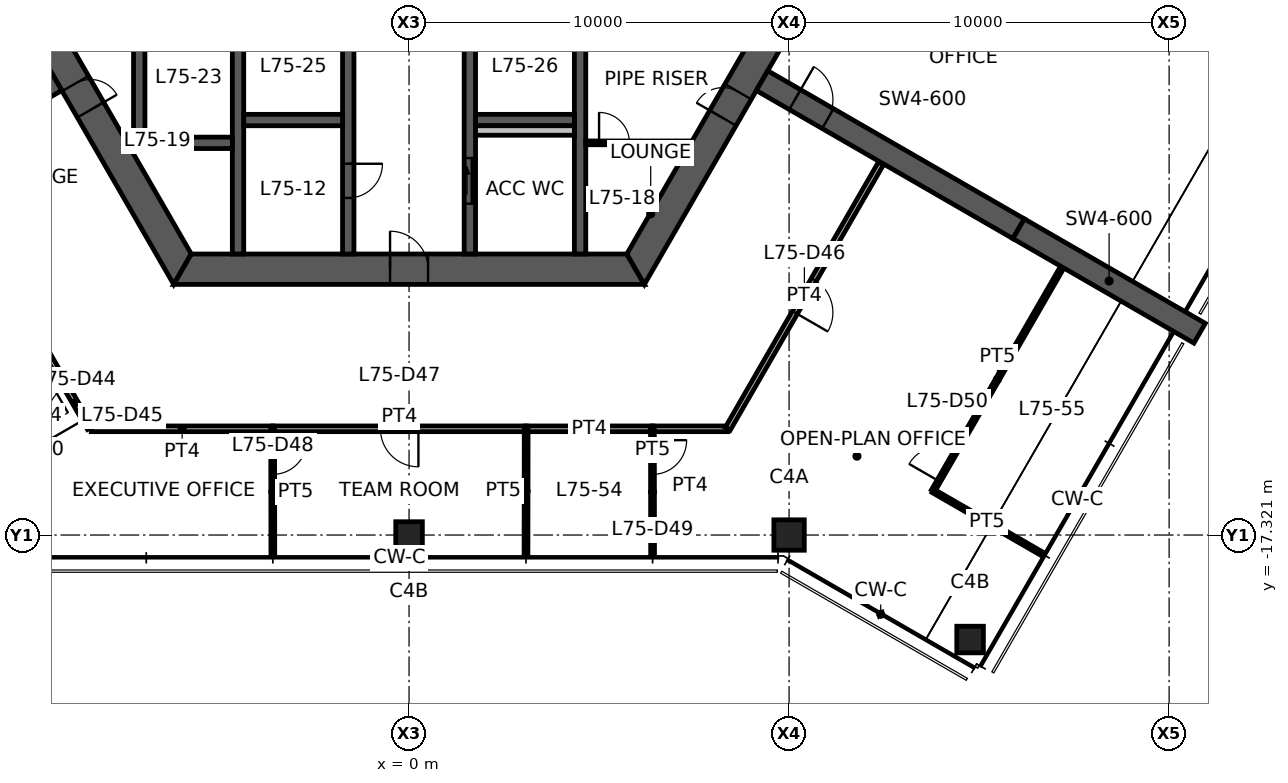
"""IFC4 building model, lengths in metres.
Left out: names, types, materials, properties, quantities, classifications, styles, units other than length and angle.
Written with IfcOpenShell. Run it as: python <this file> out.ifc"""

import sys

from ifc_helpers import new_model, si_unit, direction, frame, frame_2d, origin, origin_2d, place, context, subcontext, project, spatial, polyline, rectangle, hollow_rectangle, outline, extrude, element, fill, save


model = new_model("IFC4")
c1 = context("Model", 3, precision=1e-05, world=origin(), true_north=direction((0.0, 1.0)))
c2 = subcontext(c1, "Body", "Model", "MODEL_VIEW")
j1 = project(units=[si_unit("LENGTHUNIT", "METRE"), si_unit("PLANEANGLEUNIT", "RADIAN")], contexts=[c1])
p1 = place(None, origin())
s1 = spatial("IfcSite", under=j1, at=p1, CompositionType="ELEMENT")
p2 = place(p1, origin())
s2 = spatial("IfcBuilding", under=s1, at=p2, CompositionType="ELEMENT")
p3 = place(p2, frame((0.0, 0.0, 298.6)))
s3 = spatial("IfcBuildingStorey", under=s2, at=p3, CompositionType="ELEMENT", Elevation=298.6)
p4 = place(p3, frame((10.0, -17.321, 0.0), z_axis=(0.0, 0.0, 1.0), x_axis=(1.0, 0.0, 0.0)))
e1 = element("IfcColumn", 1, at=p4, inside=s3, PredefinedType="COLUMN", context=c2, shape_type="SweptSolid", body=[
    extrude(hollow_rectangle(XDim=0.8, YDim=0.8, WallThickness=0.04, at=origin_2d()), origin(), (0.0, 0.0, 1.0), 3.9),
])
for number, where, z_axis, x_axis in (
    (2, (0.0, -17.321, 0.0), (0.0, 0.0, 1.0), (1.0, 0.0, 0.0)),
    (3, (14.763, -20.071, 0.0), (0.0, 0.0, 1.0), (1.0, 0.0, 0.0)),
):
    element("IfcColumn", number, at=place(p3, frame(where, z_axis=z_axis, x_axis=x_axis)), inside=s3, PredefinedType="COLUMN", context=c2, shape_type="SweptSolid", body=[
        extrude(hollow_rectangle(XDim=0.7, YDim=0.7, WallThickness=0.032, at=origin_2d()), origin(), (0.0, 0.0, 1.0), 3.9),
    ])
p5 = place(p3, frame((-11.922, 0.0, 0.0), z_axis=(0.0, 0.0, 1.0), x_axis=(0.500004296715, -0.866022923061, 0.0)))
e4 = element("IfcWall", 4, at=p5, inside=s3, PredefinedType="SHEAR", context=c2, shape_type="SweptSolid", body=[
    extrude(outline(polyline([(-0.231, -0.4), (6.281, -0.4), (7.081, -0.4), (12.153, -0.4), (11.691, 0.4), (7.081, 0.4), (6.281, 0.4), (0.231, 0.4), (-0.231, -0.4)])), origin(), (0.0, 0.0, 1.0), 3.9),
])
p6 = place(p5, frame((6.281, 0.0, 0.0)))
e5 = element("IfcOpeningElement", 5, at=p6, cuts=e4, PredefinedType="OPENING", context=c2, shape_type="SweptSolid", body=[
    extrude(rectangle(XDim=0.8, YDim=2.1, at=frame_2d((0.4, 1.05))), frame((0.0, 0.41, 0.0), z_axis=(0.0, -1.0, 0.0), x_axis=(1.0, 0.0, 0.0)), (0.0, 0.0, 1.0), 0.82),
])
p7 = place(p3, frame((-5.961, -10.325, 0.0), z_axis=(0.0, 0.0, 1.0), x_axis=(1.0, 0.0, 0.0)))
e6 = element("IfcWall", 6, at=p7, inside=s3, PredefinedType="SHEAR", context=c2, shape_type="SweptSolid", body=[
    extrude(outline(polyline([(-0.231, -0.4), (5.461, -0.4), (6.461, -0.4), (12.153, -0.4), (11.691, 0.4), (6.461, 0.4), (5.461, 0.4), (0.231, 0.4), (-0.231, -0.4)])), origin(), (0.0, 0.0, 1.0), 3.9),
])
p8 = place(p7, frame((5.461, 0.0, 0.0)))
e7 = element("IfcOpeningElement", 7, at=p8, cuts=e6, PredefinedType="OPENING", context=c2, shape_type="SweptSolid", body=[
    extrude(rectangle(XDim=1.0, YDim=2.1, at=frame_2d((0.5, 1.05))), frame((0.0, 0.41, 0.0), z_axis=(0.0, -1.0, 0.0), x_axis=(1.0, 0.0, 0.0)), (0.0, 0.0, 1.0), 0.82),
])
p9 = place(p3, frame((5.961, -10.325, 0.0), z_axis=(0.0, 0.0, 1.0), x_axis=(0.500004296715, 0.866022923061, 0.0)))
e8 = element("IfcWall", 8, at=p9, inside=s3, PredefinedType="SHEAR", context=c2, shape_type="SweptSolid", body=[
    extrude(outline(polyline([(-0.231, -0.4), (4.594, -0.4), (5.394, -0.4), (12.153, -0.4), (11.691, 0.4), (5.394, 0.4), (4.594, 0.4), (0.231, 0.4), (-0.231, -0.4)])), origin(), (0.0, 0.0, 1.0), 3.9),
])
p10 = place(p9, frame((4.594, 0.0, 0.0)))
e9 = element("IfcOpeningElement", 9, at=p10, cuts=e8, PredefinedType="OPENING", context=c2, shape_type="SweptSolid", body=[
    extrude(rectangle(XDim=0.8, YDim=2.1, at=frame_2d((0.4, 1.05))), frame((0.0, 0.41, 0.0), z_axis=(0.0, -1.0, 0.0), x_axis=(1.0, 0.0, 0.0)), (0.0, 0.0, 1.0), 0.82),
])
p11 = place(p3, frame((-9.288, -5.363, 0.0), z_axis=(0.0, 0.0, 1.0), x_axis=(-0.866027473358, -0.499996415376, 0.0)))
e10 = element("IfcWall", 10, at=p11, inside=s3, PredefinedType="SHEAR", context=c2, shape_type="SweptSolid", body=[
    extrude(rectangle(XDim=7.045, YDim=0.6, at=frame_2d((3.523, 0.0))), origin(), (0.0, 0.0, 1.0), 3.9),
])
p12 = place(p11, frame((1.0, 0.0, 0.0)))
e11 = element("IfcOpeningElement", 11, at=p12, cuts=e10, PredefinedType="OPENING", context=c2, shape_type="SweptSolid", body=[
    extrude(rectangle(XDim=1.0, YDim=2.1, at=frame_2d((0.5, 1.05))), frame((0.0, 0.31, 0.0), z_axis=(0.0, -1.0, 0.0), x_axis=(1.0, 0.0, 0.0)), (0.0, 0.0, 1.0), 0.62),
])
p13 = place(p3, frame((9.288, -5.363, 0.0), z_axis=(0.0, 0.0, 1.0), x_axis=(0.866031736626, -0.499989031036, 0.0)))
e12 = element("IfcWall", 12, at=p13, inside=s3, PredefinedType="SHEAR", context=c2, shape_type="SweptSolid", body=[
    extrude(rectangle(XDim=7.796, YDim=0.6, at=frame_2d((3.898, 0.0))), origin(), (0.0, 0.0, 1.0), 3.9),
])
p14 = place(p13, frame((1.0, 0.0, 0.0)))
e13 = element("IfcOpeningElement", 13, at=p14, cuts=e12, PredefinedType="OPENING", context=c2, shape_type="SweptSolid", body=[
    extrude(rectangle(XDim=1.0, YDim=2.1, at=frame_2d((0.5, 1.05))), frame((0.0, 0.31, 0.0), z_axis=(0.0, -1.0, 0.0), x_axis=(1.0, 0.0, 0.0)), (0.0, 0.0, 1.0), 0.62),
])
p15 = place(p3, frame((16.039, -9.26, 0.0), z_axis=(0.0, 0.0, 1.0), x_axis=(0.866027397988, -0.499996545922, 0.0)))
e14 = element("IfcWall", 14, at=p15, inside=s3, PredefinedType="SHEAR", context=c2, shape_type="SweptSolid", body=[
    extrude(rectangle(XDim=5.5, YDim=0.6, at=frame_2d((2.75, 0.0))), origin(), (0.0, 0.0, 1.0), 3.9),
])
p16 = place(p3, frame((-1.6, -3.75, 0.0), z_axis=(0.0, 0.0, 1.0), x_axis=(0.0, -1.0, 0.0)))
e15 = element("IfcWall", 15, at=p16, inside=s3, PredefinedType="SHEAR", context=c2, shape_type="SweptSolid", body=[
    extrude(rectangle(XDim=6.175, YDim=0.3, at=frame_2d((3.087, 0.0))), origin(), (0.0, 0.0, 1.0), 3.9),
])
p17 = place(p16, frame((3.8, 0.0, 0.0)))
e16 = element("IfcOpeningElement", 16, at=p17, cuts=e15, PredefinedType="OPENING", context=c2, shape_type="SweptSolid", body=[
    extrude(rectangle(XDim=0.9, YDim=2.1, at=frame_2d((0.45, 1.05))), frame((0.0, 0.16, 0.0), z_axis=(0.0, -1.0, 0.0), x_axis=(1.0, 0.0, 0.0)), (0.0, 0.0, 1.0), 0.32),
])
p18 = place(p3, frame((1.6, -3.75, 0.0), z_axis=(0.0, 0.0, 1.0), x_axis=(0.0, -1.0, 0.0)))
e17 = element("IfcWall", 17, at=p18, inside=s3, PredefinedType="SHEAR", context=c2, shape_type="SweptSolid", body=[
    extrude(rectangle(XDim=6.175, YDim=0.3, at=frame_2d((3.087, 0.0))), origin(), (0.0, 0.0, 1.0), 3.9),
])
p19 = place(p18, frame((3.65, 0.0, 0.0)))
e18 = element("IfcOpeningElement", 18, at=p19, cuts=e17, PredefinedType="OPENING", context=c2, shape_type="SweptSolid", body=[
    extrude(rectangle(XDim=1.2, YDim=2.1, at=frame_2d((0.6, 1.05))), frame((0.0, 0.16, 0.0), z_axis=(0.0, -1.0, 0.0), x_axis=(1.0, 0.0, 0.0)), (0.0, 0.0, 1.0), 0.32),
])
for number, where, z_axis, x_axis in (
    (19, (-4.5, -3.75, 0.0), (0.0, 0.0, 1.0), (0.0, -1.0, 0.0)),
    (20, (4.5, -3.75, 0.0), (0.0, 0.0, 1.0), (0.0, -1.0, 0.0)),
):
    element("IfcWall", number, at=place(p3, frame(where, z_axis=z_axis, x_axis=x_axis)), inside=s3, PredefinedType="SHEAR", context=c2, shape_type="SweptSolid", body=[
        extrude(rectangle(XDim=6.175, YDim=0.3, at=frame_2d((3.087, 0.0))), origin(), (0.0, 0.0, 1.0), 3.9),
    ])
for number, where, z_axis, x_axis in (
    (21, (-4.35, -6.4, 0.0), (0.0, 0.0, 1.0), (1.0, 0.0, 0.0)),
    (22, (1.75, -6.4, 0.0), (0.0, 0.0, 1.0), (1.0, 0.0, 0.0)),
    (23, (-7.25, -7.0, 0.0), (0.0, 0.0, 1.0), (1.0, 0.0, 0.0)),
):
    element("IfcWall", number, at=place(p3, frame(where, z_axis=z_axis, x_axis=x_axis)), inside=s3, PredefinedType="SHEAR", context=c2, shape_type="SweptSolid", body=[
        extrude(rectangle(XDim=2.6, YDim=0.3, at=frame_2d((1.3, 0.0))), origin(), (0.0, 0.0, 1.0), 3.9),
    ])
p20 = place(p3, frame((-7.1, -3.75, 0.0), z_axis=(0.0, 0.0, 1.0), x_axis=(0.0, -1.0, 0.0)))
e24 = element("IfcWall", 24, at=p20, inside=s3, PredefinedType="SHEAR", context=c2, shape_type="SweptSolid", body=[
    extrude(rectangle(XDim=3.1, YDim=0.3, at=frame_2d((1.55, 0.0))), origin(), (0.0, 0.0, 1.0), 3.9),
])
p21 = place(p3, frame((1.75, -6.675, 0.0), z_axis=(0.0, 0.0, 1.0), x_axis=(1.0, 0.0, 0.0)))
e25 = element("IfcWall", 25, at=p21, inside=s3, PredefinedType="PLUMBINGWALL", context=c2, shape_type="SweptSolid", body=[
    extrude(rectangle(XDim=2.6, YDim=0.25, at=frame_2d((1.3, 0.0))), origin(), (0.0, 0.0, 1.0), 3.9),
])
p22 = place(p3, frame((4.65, -7.0, 0.0), z_axis=(0.0, 0.0, 1.0), x_axis=(1.0, 0.0, 0.0)))
e26 = element("IfcWall", 26, at=p22, inside=s3, PredefinedType="PARTITIONING", context=c2, shape_type="SweptSolid", body=[
    extrude(outline(polyline([(0.0, -0.05), (0.35, -0.05), (1.15, -0.05), (2.74, -0.05), (2.769, 0.0), (2.775, 0.05), (1.15, 0.05), (0.35, 0.05), (0.0, 0.05), (0.0, -0.05)])), origin(), (0.0, 0.0, 1.0), 2.35),
])
p23 = place(p22, frame((0.35, 0.0, 0.0)))
e27 = element("IfcOpeningElement", 27, at=p23, cuts=e26, PredefinedType="OPENING", context=c2, shape_type="SweptSolid", body=[
    extrude(rectangle(XDim=0.8, YDim=2.1, at=frame_2d((0.4, 1.05))), frame((0.0, 0.06, 0.0), z_axis=(0.0, -1.0, 0.0), x_axis=(1.0, 0.0, 0.0)), (0.0, 0.0, 1.0), 0.12),
])
p24 = place(p3, frame((-9.161, -13.183, 0.0), z_axis=(0.0, 0.0, 1.0), x_axis=(-0.500032973541, 0.866006365664, 0.0)))
e28 = element("IfcWall", 28, at=p24, inside=s3, PredefinedType="PARTITIONING", context=c2, shape_type="SweptSolid", body=[
    extrude(rectangle(XDim=3.426, YDim=0.15, at=frame_2d((1.713, 0.0))), origin(), (0.0, 0.0, 1.0), 2.35),
])
p25 = place(p3, frame((-8.398, -14.505, 0.0), z_axis=(0.0, 0.0, 1.0), x_axis=(-0.499933379091, 0.866063863968, 0.0)))
e29 = element("IfcWall", 29, at=p25, inside=s3, PredefinedType="PARTITIONING", context=c2, shape_type="SweptSolid", body=[
    extrude(rectangle(XDim=1.536, YDim=0.15, at=frame_2d((0.768, 0.0))), origin(), (0.0, 0.0, 1.0), 2.35),
])
p26 = place(p25, frame((0.268, 0.0, 0.0)))
e30 = element("IfcOpeningElement", 30, at=p26, cuts=e29, PredefinedType="OPENING", context=c2, shape_type="SweptSolid", body=[
    extrude(rectangle(XDim=1.0, YDim=2.1, at=frame_2d((0.5, 1.05))), frame((0.0, 0.085, 0.0), z_axis=(0.0, -1.0, 0.0), x_axis=(1.0, 0.0, 0.0)), (0.0, 0.0, 1.0), 0.17),
])
p27 = place(p3, frame((-9.166, -13.174, 0.0), z_axis=(0.0, 0.0, 1.0), x_axis=(-0.865342122637, -0.501181614577, 0.0)))
e31 = element("IfcWall", 31, at=p27, inside=s3, PredefinedType="PARTITIONING", context=c2, shape_type="SweptSolid", body=[
    extrude(rectangle(XDim=3.311, YDim=0.1, at=frame_2d((1.655, 0.0))), origin(), (0.0, 0.0, 1.0), 2.35),
])
p28 = place(p27, frame((0.3, 0.0, 0.0)))
e32 = element("IfcOpeningElement", 32, at=p28, cuts=e31, PredefinedType="OPENING", context=c2, shape_type="SweptSolid", body=[
    extrude(rectangle(XDim=0.9, YDim=2.1, at=frame_2d((0.45, 1.05))), frame((0.0, 0.06, 0.0), z_axis=(0.0, -1.0, 0.0), x_axis=(1.0, 0.0, 0.0)), (0.0, 0.0, 1.0), 0.12),
])
p29 = place(p3, frame((-3.58, -14.525, 0.0), z_axis=(0.0, 0.0, 1.0), x_axis=(-1.0, 0.0, 0.0)))
e33 = element("IfcWall", 33, at=p29, inside=s3, PredefinedType="PARTITIONING", context=c2, shape_type="SweptSolid", body=[
    extrude(rectangle(XDim=4.783, YDim=0.15, at=frame_2d((2.392, 0.0))), origin(), (0.0, 0.0, 1.0), 2.35),
])
p30 = place(p3, frame((6.413, -14.525, 0.0), z_axis=(0.0, 0.0, 1.0), x_axis=(-1.0, 0.0, 0.0)))
e34 = element("IfcWall", 34, at=p30, inside=s3, PredefinedType="PARTITIONING", context=c2, shape_type="SweptSolid", body=[
    extrude(rectangle(XDim=3.341, YDim=0.15, at=frame_2d((1.67, 0.0))), origin(), (0.0, 0.0, 1.0), 2.35),
])
p31 = place(p3, frame((8.386, -14.525, 0.0), z_axis=(0.0, 0.0, 1.0), x_axis=(-1.0, 0.0, 0.0)))
e35 = element("IfcWall", 35, at=p31, inside=s3, PredefinedType="PARTITIONING", context=c2, shape_type="SweptSolid", body=[
    extrude(rectangle(XDim=1.982, YDim=0.15, at=frame_2d((0.991, 0.0))), origin(), (0.0, 0.0, 1.0), 2.35),
])
p32 = place(p3, frame((12.419, -7.54, 0.0), z_axis=(0.0, 0.0, 1.0), x_axis=(-0.499996687877, -0.866027316031, 0.0)))
e36 = element("IfcWall", 36, at=p32, inside=s3, PredefinedType="PARTITIONING", context=c2, shape_type="SweptSolid", body=[
    extrude(rectangle(XDim=8.066, YDim=0.15, at=frame_2d((4.033, 0.0))), origin(), (0.0, 0.0, 1.0), 2.35),
])
p33 = place(p32, frame((3.533, 0.0, 0.0)))
e37 = element("IfcOpeningElement", 37, at=p33, cuts=e36, PredefinedType="OPENING", context=c2, shape_type="SweptSolid", body=[
    extrude(rectangle(XDim=1.0, YDim=2.1, at=frame_2d((0.5, 1.05))), frame((0.0, 0.085, 0.0), z_axis=(0.0, -1.0, 0.0), x_axis=(1.0, 0.0, 0.0)), (0.0, 0.0, 1.0), 0.17),
])
p34 = place(p3, frame((3.082, -14.525, 0.0), z_axis=(0.0, 0.0, 1.0), x_axis=(-1.0, 0.0, 0.0)))
e38 = element("IfcWall", 38, at=p34, inside=s3, PredefinedType="PARTITIONING", context=c2, shape_type="SweptSolid", body=[
    extrude(rectangle(XDim=6.671, YDim=0.15, at=frame_2d((3.335, 0.0))), origin(), (0.0, 0.0, 1.0), 2.35),
])
p35 = place(p34, frame((2.835, 0.0, 0.0)))
e39 = element("IfcOpeningElement", 39, at=p35, cuts=e38, PredefinedType="OPENING", context=c2, shape_type="SweptSolid", body=[
    extrude(rectangle(XDim=1.0, YDim=2.1, at=frame_2d((0.5, 1.05))), frame((0.0, 0.085, 0.0), z_axis=(0.0, -1.0, 0.0), x_axis=(1.0, 0.0, 0.0)), (0.0, 0.0, 1.0), 0.17),
])
p36 = place(p3, frame((-3.589, -14.525, 0.0), z_axis=(0.0, 0.0, 1.0), x_axis=(0.001401178566, -0.999999018349, 0.0)))
e40 = element("IfcWall", 40, at=p36, inside=s3, PredefinedType="PARTITIONING", context=c2, shape_type="SweptSolid", body=[
    extrude(rectangle(XDim=3.311, YDim=0.1, at=frame_2d((1.655, 0.0))), origin(), (0.0, 0.0, 1.0), 2.35),
])
p37 = place(p36, frame((0.3, 0.0, 0.0)))
e41 = element("IfcOpeningElement", 41, at=p37, cuts=e40, PredefinedType="OPENING", context=c2, shape_type="SweptSolid", body=[
    extrude(rectangle(XDim=0.9, YDim=2.1, at=frame_2d((0.45, 1.05))), frame((0.0, 0.06, 0.0), z_axis=(0.0, -1.0, 0.0), x_axis=(1.0, 0.0, 0.0)), (0.0, 0.0, 1.0), 0.12),
])
p38 = place(p3, frame((6.404, -14.525, 0.0), z_axis=(0.0, 0.0, 1.0), x_axis=(0.001401178566, -0.999999018349, 0.0)))
e42 = element("IfcWall", 42, at=p38, inside=s3, PredefinedType="PARTITIONING", context=c2, shape_type="SweptSolid", body=[
    extrude(rectangle(XDim=3.311, YDim=0.1, at=frame_2d((1.655, 0.0))), origin(), (0.0, 0.0, 1.0), 2.35),
])
p39 = place(p38, frame((0.3, 0.0, 0.0)))
e43 = element("IfcOpeningElement", 43, at=p39, cuts=e42, PredefinedType="OPENING", context=c2, shape_type="SweptSolid", body=[
    extrude(rectangle(XDim=0.9, YDim=2.1, at=frame_2d((0.45, 1.05))), frame((0.0, 0.06, 0.0), z_axis=(0.0, -1.0, 0.0), x_axis=(1.0, 0.0, 0.0)), (0.0, 0.0, 1.0), 0.12),
])
p40 = place(p3, frame((3.077, -17.801, 0.0), z_axis=(0.0, 0.0, 1.0), x_axis=(0.001341580368, 0.999999100081, 0.0)))
e44 = element("IfcWall", 44, at=p40, inside=s3, PredefinedType="PARTITIONING", context=c2, shape_type="SweptSolid", body=[
    extrude(rectangle(XDim=3.276, YDim=0.1, at=frame_2d((1.638, 0.0))), origin(), (0.0, 0.0, 1.0), 2.35),
])
p41 = place(p3, frame((13.788, -16.159, 0.0), z_axis=(0.0, 0.0, 1.0), x_axis=(0.499992600721, 0.866029675718, 0.0)))
e45 = element("IfcWall", 45, at=p41, inside=s3, PredefinedType="PARTITIONING", context=c2, shape_type="SweptSolid", body=[
    extrude(rectangle(XDim=6.78, YDim=0.1, at=frame_2d((3.39, 0.0))), origin(), (0.0, 0.0, 1.0), 2.35),
])
p42 = place(p41, frame((0.3, 0.0, 0.0)))
e46 = element("IfcOpeningElement", 46, at=p42, cuts=e45, PredefinedType="OPENING", context=c2, shape_type="SweptSolid", body=[
    extrude(rectangle(XDim=0.9, YDim=2.1, at=frame_2d((0.45, 1.05))), frame((0.0, 0.06, 0.0), z_axis=(0.0, -1.0, 0.0), x_axis=(1.0, 0.0, 0.0)), (0.0, 0.0, 1.0), 0.12),
])
p43 = place(p3, frame((16.629, -17.799, 0.0), z_axis=(0.0, 0.0, 1.0), x_axis=(-0.866008333849, 0.50002956483, 0.0)))
e47 = element("IfcWall", 47, at=p43, inside=s3, PredefinedType="PARTITIONING", context=c2, shape_type="SweptSolid", body=[
    extrude(rectangle(XDim=3.28, YDim=0.1, at=frame_2d((1.64, 0.0))), origin(), (0.0, 0.0, 1.0), 2.35),
])
p44 = place(p8, origin())
e48 = element("IfcDoor", 48, at=p44, inside=s3, OperationType="SINGLE_SWING_LEFT", PredefinedType="DOOR", context=c2, shape_type="SweptSolid", body=[
    extrude(rectangle(XDim=1.0, YDim=2.1, at=frame_2d((0.5, 1.05))), frame((0.0, 0.025, 0.0), z_axis=(0.0, -1.0, 0.0), x_axis=(1.0, 0.0, 0.0)), (0.0, 0.0, 1.0), 0.05),
])
fill(e7, e48)
p45 = place(p10, origin())
e49 = element("IfcDoor", 49, at=p45, inside=s3, OperationType="SINGLE_SWING_LEFT", PredefinedType="DOOR", context=c2, shape_type="SweptSolid", body=[
    extrude(rectangle(XDim=0.8, YDim=2.1, at=frame_2d((0.4, 1.05))), frame((0.0, 0.025, 0.0), z_axis=(0.0, -1.0, 0.0), x_axis=(1.0, 0.0, 0.0)), (0.0, 0.0, 1.0), 0.05),
])
fill(e9, e49)
p46 = place(p6, origin())
e50 = element("IfcDoor", 50, at=p46, inside=s3, OperationType="SINGLE_SWING_RIGHT", PredefinedType="DOOR", context=c2, shape_type="SweptSolid", body=[
    extrude(rectangle(XDim=0.8, YDim=2.1, at=frame_2d((0.4, 1.05))), frame((0.0, 0.025, 0.0), z_axis=(0.0, -1.0, 0.0), x_axis=(1.0, 0.0, 0.0)), (0.0, 0.0, 1.0), 0.05),
])
fill(e5, e50)
p47 = place(p19, origin())
e51 = element("IfcDoor", 51, at=p47, inside=s3, OperationType="SLIDING_TO_LEFT", PredefinedType="DOOR", context=c2, shape_type="SweptSolid", body=[
    extrude(rectangle(XDim=1.2, YDim=2.1, at=frame_2d((0.6, 1.05))), frame((0.0, 0.025, 0.0), z_axis=(0.0, -1.0, 0.0), x_axis=(1.0, 0.0, 0.0)), (0.0, 0.0, 1.0), 0.05),
])
fill(e18, e51)
p48 = place(p17, origin())
e52 = element("IfcDoor", 52, at=p48, inside=s3, OperationType="SINGLE_SWING_LEFT", PredefinedType="DOOR", context=c2, shape_type="SweptSolid", body=[
    extrude(rectangle(XDim=0.9, YDim=2.1, at=frame_2d((0.45, 1.05))), frame((0.0, 0.025, 0.0), z_axis=(0.0, -1.0, 0.0), x_axis=(1.0, 0.0, 0.0)), (0.0, 0.0, 1.0), 0.05),
])
fill(e16, e52)
p49 = place(p14, origin())
e53 = element("IfcDoor", 53, at=p49, inside=s3, OperationType="SINGLE_SWING_LEFT", PredefinedType="DOOR", context=c2, shape_type="SweptSolid", body=[
    extrude(rectangle(XDim=1.0, YDim=2.1, at=frame_2d((0.5, 1.05))), frame((0.0, 0.025, 0.0), z_axis=(0.0, -1.0, 0.0), x_axis=(1.0, 0.0, 0.0)), (0.0, 0.0, 1.0), 0.05),
])
fill(e13, e53)
p50 = place(p23, origin())
e54 = element("IfcDoor", 54, at=p50, inside=s3, OperationType="SINGLE_SWING_LEFT", PredefinedType="DOOR", context=c2, shape_type="SweptSolid", body=[
    extrude(rectangle(XDim=0.8, YDim=2.1, at=frame_2d((0.4, 1.05))), frame((0.0, 0.025, 0.0), z_axis=(0.0, -1.0, 0.0), x_axis=(1.0, 0.0, 0.0)), (0.0, 0.0, 1.0), 0.05),
])
fill(e27, e54)
p51 = place(p26, origin())
e55 = element("IfcDoor", 55, at=p51, inside=s3, OperationType="SINGLE_SWING_LEFT", PredefinedType="DOOR", context=c2, shape_type="SweptSolid", body=[
    extrude(rectangle(XDim=1.0, YDim=2.1, at=frame_2d((0.5, 1.05))), frame((0.0, 0.025, 0.0), z_axis=(0.0, -1.0, 0.0), x_axis=(1.0, 0.0, 0.0)), (0.0, 0.0, 1.0), 0.05),
])
fill(e30, e55)
p52 = place(p33, origin())
e56 = element("IfcDoor", 56, at=p52, inside=s3, OperationType="SINGLE_SWING_RIGHT", PredefinedType="DOOR", context=c2, shape_type="SweptSolid", body=[
    extrude(rectangle(XDim=1.0, YDim=2.1, at=frame_2d((0.5, 1.05))), frame((0.0, 0.025, 0.0), z_axis=(0.0, -1.0, 0.0), x_axis=(1.0, 0.0, 0.0)), (0.0, 0.0, 1.0), 0.05),
])
fill(e37, e56)
p53 = place(p35, origin())
e57 = element("IfcDoor", 57, at=p53, inside=s3, OperationType="SINGLE_SWING_LEFT", PredefinedType="DOOR", context=c2, shape_type="SweptSolid", body=[
    extrude(rectangle(XDim=1.0, YDim=2.1, at=frame_2d((0.5, 1.05))), frame((0.0, 0.025, 0.0), z_axis=(0.0, -1.0, 0.0), x_axis=(1.0, 0.0, 0.0)), (0.0, 0.0, 1.0), 0.05),
])
fill(e39, e57)
p54 = place(p37, origin())
e58 = element("IfcDoor", 58, at=p54, inside=s3, OperationType="SINGLE_SWING_LEFT", PredefinedType="DOOR", context=c2, shape_type="SweptSolid", body=[
    extrude(rectangle(XDim=0.9, YDim=2.1, at=frame_2d((0.45, 1.05))), frame((0.0, 0.025, 0.0), z_axis=(0.0, -1.0, 0.0), x_axis=(1.0, 0.0, 0.0)), (0.0, 0.0, 1.0), 0.05),
])
fill(e41, e58)
p55 = place(p39, origin())
e59 = element("IfcDoor", 59, at=p55, inside=s3, OperationType="SINGLE_SWING_LEFT", PredefinedType="DOOR", context=c2, shape_type="SweptSolid", body=[
    extrude(rectangle(XDim=0.9, YDim=2.1, at=frame_2d((0.45, 1.05))), frame((0.0, 0.025, 0.0), z_axis=(0.0, -1.0, 0.0), x_axis=(1.0, 0.0, 0.0)), (0.0, 0.0, 1.0), 0.05),
])
fill(e43, e59)
p56 = place(p42, origin())
e60 = element("IfcDoor", 60, at=p56, inside=s3, OperationType="SINGLE_SWING_LEFT", PredefinedType="DOOR", context=c2, shape_type="SweptSolid", body=[
    extrude(rectangle(XDim=0.9, YDim=2.1, at=frame_2d((0.45, 1.05))), frame((0.0, 0.025, 0.0), z_axis=(0.0, -1.0, 0.0), x_axis=(1.0, 0.0, 0.0)), (0.0, 0.0, 1.0), 0.05),
])
fill(e46, e60)
save(model, sys.argv[1])
